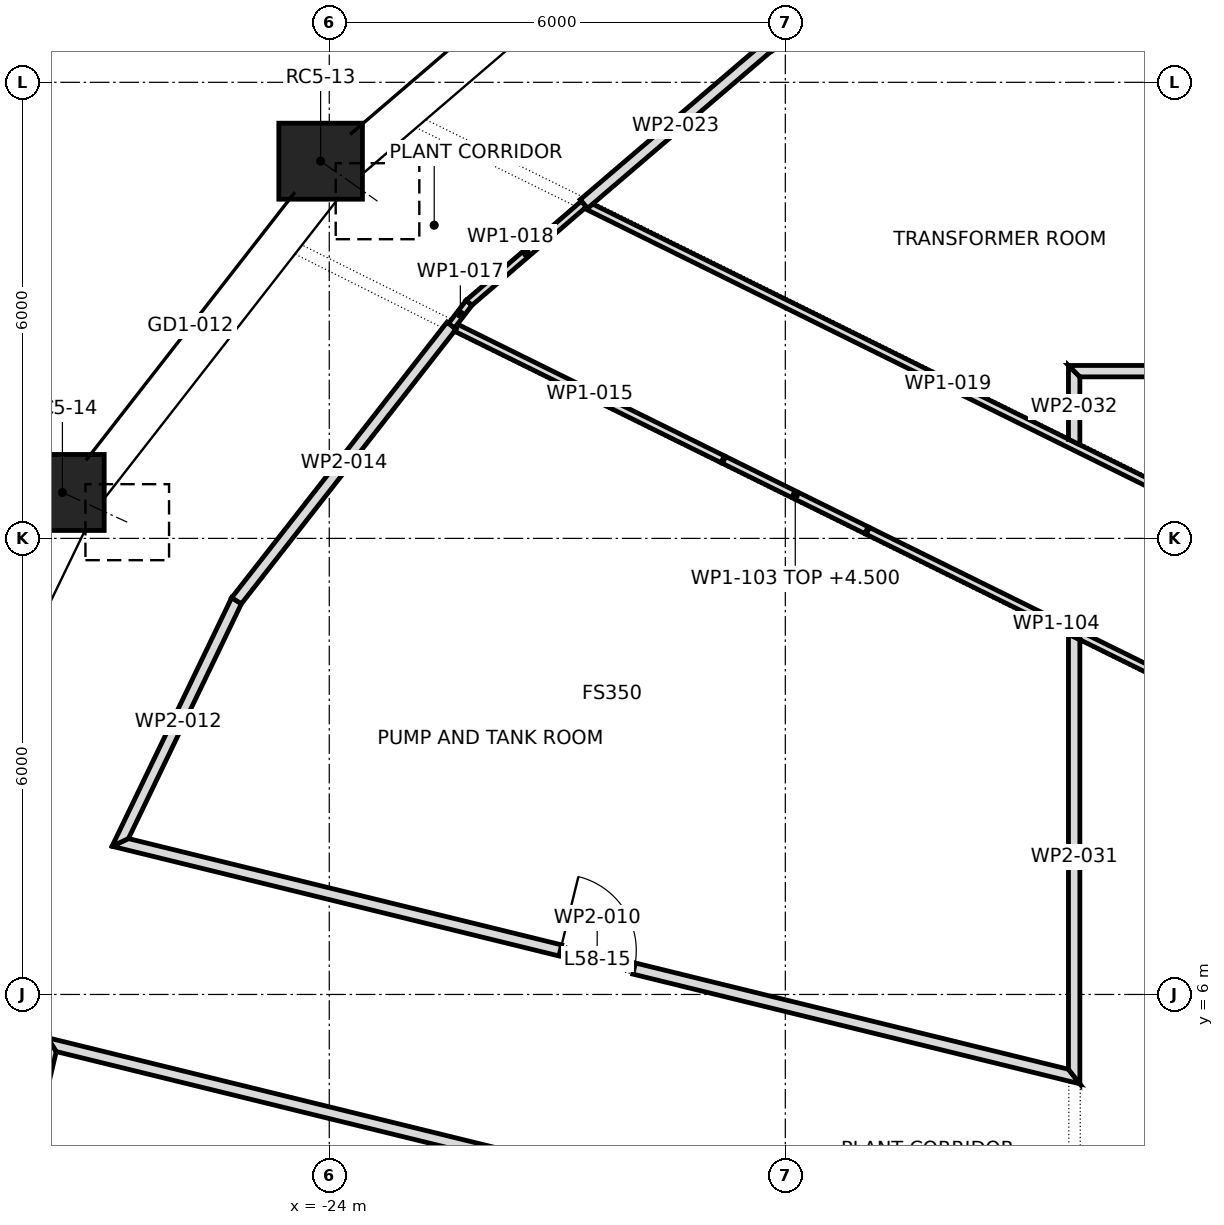
"""IFC4 building model, lengths in metres.
Left out: names, types, materials, properties, quantities, classifications, styles, units other than length and angle.
Written with IfcOpenShell. Run it as: python <this file> out.ifc"""

import sys

from ifc_helpers import new_model, si_unit, direction, frame, frame_2d, origin, origin_2d, place, context, subcontext, project, spatial, polyline, rectangle, outline, extrude, element, fill, save


model = new_model("IFC4")
c1 = context("Model", 3, precision=1e-05, world=origin(), true_north=direction((0.0, 1.0)))
c2 = subcontext(c1, "Body", "Model", "MODEL_VIEW")
j1 = project(units=[si_unit("LENGTHUNIT", "METRE"), si_unit("PLANEANGLEUNIT", "RADIAN")], contexts=[c1])
p1 = place(None, origin())
s1 = spatial("IfcSite", under=j1, at=p1, CompositionType="ELEMENT")
p2 = place(p1, origin())
s2 = spatial("IfcBuilding", under=s1, at=p2, CompositionType="ELEMENT")
p3 = place(p2, frame((0.0, 0.0, 250.9)))
s3 = spatial("IfcBuildingStorey", under=s2, at=p3, CompositionType="ELEMENT", Elevation=250.9)
p4 = place(p3, frame((-24.114, 16.962, 0.086), z_axis=(0.14102688006, -0.099169586892, 0.985026300226), x_axis=(0.575215805529, 0.818001697473, 0.0)))
e1 = element("IfcColumn", 1, at=p4, inside=s3, PredefinedType="COLUMN", context=c2, shape_type="SweptSolid", body=[
    extrude(rectangle(XDim=1.1, YDim=1.0, at=origin_2d()), origin(), (0.0, 0.0, 1.0), 5.308),
])
p5 = place(p3, frame((-27.511, 12.604, 0.088), z_axis=(0.160721780276, -0.073644982891, 0.984248406572), x_axis=(0.416565116305, 0.909105881555, 0.0)))
e2 = element("IfcColumn", 2, at=p5, inside=s3, PredefinedType="COLUMN", context=c2, shape_type="SweptSolid", body=[
    extrude(rectangle(XDim=1.1, YDim=1.0, at=origin_2d()), origin(), (0.0, 0.0, 1.0), 5.307),
])
p6 = place(p3, frame((-28.362, 2.302, 0.0), z_axis=(0.0, 0.0, 1.0), x_axis=(0.228907359016, 0.973448211765, 0.0)))
e3 = element("IfcWall", 3, at=p6, inside=s3, PredefinedType="PARTITIONING", context=c2, shape_type="SweptSolid", body=[
    extrude(outline(polyline([(0.017, -0.075), (1.531, -0.075), (3.045, -0.075), (3.196, 0.075), (1.598, 0.075), (0.0, 0.075), (0.017, -0.075)])), origin(), (0.0, 0.0, 1.0), 5.1),
])
p7 = place(p3, frame((-27.721, 5.357, 0.0), z_axis=(0.0, 0.0, 1.0), x_axis=(0.971194300178, -0.238288965968, 0.0)))
e4 = element("IfcWall", 4, at=p7, inside=s3, PredefinedType="PARTITIONING", context=c2, shape_type="SweptSolid", body=[
    extrude(outline(polyline([(0.151, -0.075), (2.11, -0.075), (4.069, -0.075), (6.028, -0.075), (7.987, -0.075), (9.946, -0.075), (11.905, -0.075), (13.863, -0.075), (13.981, 0.075), (11.984, 0.075), (9.986, 0.075), (7.989, 0.075), (5.992, 0.075), (3.995, 0.075), (1.997, 0.075), (0.0, 0.075), (0.0, 0.075), (0.151, -0.075)])), origin(), (0.0, 0.0, 1.0), 5.1),
])
p8 = place(p3, frame((-26.84, 8.022, 0.0), z_axis=(0.0, 0.0, 1.0), x_axis=(0.971181734847, -0.238340172652, 0.0)))
e5 = element("IfcWall", 5, at=p8, inside=s3, PredefinedType="PARTITIONING", context=c2, shape_type="SweptSolid", body=[
    extrude(outline(polyline([(0.0, -0.075), (1.873, -0.075), (3.746, -0.075), (5.619, -0.075), (7.492, -0.075), (9.365, -0.075), (11.238, -0.075), (13.111, -0.075), (12.919, 0.075), (11.1, 0.075), (9.281, 0.075), (7.462, 0.075), (5.643, 0.075), (3.823, 0.075), (2.004, 0.075), (0.185, 0.075), (0.0, -0.075), (0.0, -0.075)])), origin(), (0.0, 0.0, 1.0), 5.1),
])
p9 = place(p8, frame((6.054, 0.0, 0.0)))
e6 = element("IfcOpeningElement", 6, at=p9, cuts=e5, PredefinedType="OPENING", context=c2, shape_type="SweptSolid", body=[
    extrude(rectangle(XDim=1.0, YDim=2.1, at=frame_2d((0.5, 1.05))), frame((0.0, 0.087, 0.0), z_axis=(0.0, -1.0, 0.0), x_axis=(1.0, 0.0, 0.0)), (0.0, 0.0, 1.0), 0.174),
])
p10 = place(p3, frame((-25.217, 11.187, 0.0), z_axis=(0.0, 0.0, 1.0), x_axis=(-0.433546599655, -0.901131148018, 0.0)))
e7 = element("IfcWall", 7, at=p10, inside=s3, PredefinedType="PARTITIONING", context=c2, shape_type="SweptSolid", body=[
    extrude(outline(polyline([(0.0, -0.075), (1.815, -0.075), (3.629, -0.075), (3.445, 0.075), (1.73, 0.075), (0.016, 0.075), (0.0, -0.074), (0.0, -0.075)])), origin(), (0.0, 0.0, 1.0), 5.1),
])
p11 = place(p3, frame((-22.391, 14.798, 0.0), z_axis=(0.0, 0.0, 1.0), x_axis=(-0.615933342792, -0.787798271918, 0.0)))
e8 = element("IfcWall", 8, at=p11, inside=s3, PredefinedType="PARTITIONING", context=c2, shape_type="SweptSolid", body=[
    extrude(outline(polyline([(0.0, -0.075), (1.534, -0.075), (3.067, -0.075), (4.601, -0.075), (4.585, 0.075), (3.057, 0.075), (1.528, 0.075), (0.0, 0.075), (0.0, -0.075)])), origin(), (0.0, 0.0, 1.0), 5.1),
])
p12 = place(p3, frame((-22.335, 14.773, 0.0), z_axis=(0.0, 0.0, 1.0), x_axis=(0.896802594661, -0.442430905577, 0.0)))
e9 = element("IfcWall", 9, at=p12, inside=s3, PredefinedType="PARTITIONING", context=c2, shape_type="SweptSolid", body=[
    extrude(outline(polyline([(0.0, 0.05), (0.0, -0.015), (0.012, -0.017), (0.005, -0.05), (1.965, -0.05), (3.926, -0.05), (3.926, 0.05), (1.963, 0.05), (0.0, 0.05)])), origin(), (0.0, 0.0, 1.0), 5.1),
])
p13 = place(p3, frame((-22.157, 15.104, 0.0), z_axis=(0.0, 0.0, 1.0), x_axis=(-0.608085380433, -0.793871633266, 0.0)))
e10 = element("IfcWall", 10, at=p13, inside=s3, PredefinedType="PARTITIONING", context=c2, shape_type="SweptSolid", body=[
    extrude(outline(polyline([(0.0, -0.05), (0.385, -0.05), (0.385, -0.002), (0.385, 0.05), (0.323, 0.05), (0.322, 0.05), (0.322, 0.05), (0.01, 0.05), (0.01, 0.05), (0.01, 0.05), (0.005, 0.0), (0.0, -0.048), (0.0, -0.05)])), origin(), (0.0, 0.0, 1.0), 5.1),
])
p14 = place(p3, frame((-20.65, 16.4, 0.0), z_axis=(0.0, 0.0, 1.0), x_axis=(-0.757874548708, -0.652400313014, 0.0)))
e11 = element("IfcWall", 11, at=p14, inside=s3, PredefinedType="PARTITIONING", context=c2, shape_type="SweptSolid", body=[
    extrude(outline(polyline([(1.998, -0.05), (1.998, -0.049), (1.987, 0.05), (0.0, 0.05), (0.0, -0.05), (1.998, -0.05)])), origin(), (0.0, 0.0, 1.0), 5.1),
])
p15 = place(p3, frame((-20.62, 16.385, 0.0), z_axis=(0.0, 0.0, 1.0), x_axis=(0.896490791299, -0.443062367073, 0.0)))
e12 = element("IfcWall", 12, at=p15, inside=s3, PredefinedType="PARTITIONING", context=c2, shape_type="SweptSolid", body=[
    extrude(outline(polyline([(10.575, 0.05), (8.817, 0.05), (7.059, 0.05), (7.054, 0.048), (7.053, 0.05), (5.307, 0.05), (3.561, 0.05), (1.815, 0.05), (0.07, 0.05), (0.036, -0.03), (0.013, -0.02), (0.0, -0.05), (0.0, -0.05), (1.762, -0.05), (3.525, -0.05), (5.287, -0.05), (7.05, -0.05), (8.812, -0.05), (10.575, -0.05), (10.575, 0.05)])), origin(), (0.0, 0.0, 1.0), 5.1),
])
p16 = place(p3, frame((-18.235, 18.465, 0.0), z_axis=(0.0, 0.0, 1.0), x_axis=(-0.76011828392, -0.649784729315, 0.0)))
e13 = element("IfcWall", 13, at=p16, inside=s3, PredefinedType="PARTITIONING", context=c2, shape_type="SweptSolid", body=[
    extrude(outline(polyline([(3.177, 0.075), (1.596, 0.075), (0.014, 0.075), (0.0, -0.075), (1.589, -0.075), (3.177, -0.075), (3.177, 0.075)])), origin(), (0.0, 0.0, 1.0), 5.1),
])
p17 = place(p3, frame((-14.397, 20.666, 0.0), z_axis=(0.0, 0.0, 1.0), x_axis=(-0.867259694759, -0.497856025219, 0.0)))
e14 = element("IfcWall", 14, at=p17, inside=s3, PredefinedType="PARTITIONING", context=c2, shape_type="SweptSolid", body=[
    extrude(outline(polyline([(0.0, -0.075), (1.479, -0.075), (2.959, -0.075), (4.438, -0.075), (4.424, 0.075), (2.998, 0.075), (1.571, 0.075), (0.145, 0.075), (0.0, -0.075), (0.0, -0.075)])), origin(), (0.0, 0.0, 1.0), 5.1),
])
p18 = place(p17, frame((1.752, 0.0, 0.0)))
e15 = element("IfcOpeningElement", 15, at=p18, cuts=e14, PredefinedType="OPENING", context=c2, shape_type="SweptSolid", body=[
    extrude(rectangle(XDim=1.0, YDim=2.1, at=frame_2d((0.5, 1.05))), frame((0.0, 0.087, 0.0), z_axis=(0.0, -1.0, 0.0), x_axis=(1.0, 0.0, 0.0)), (0.0, 0.0, 1.0), 0.174),
])
p19 = place(p3, frame((-14.498, 20.692, 0.0), z_axis=(0.0, 0.0, 1.0), x_axis=(0.527266712456, -0.849699837552, 0.0)))
e16 = element("IfcWall", 16, at=p19, inside=s3, PredefinedType="PARTITIONING", context=c2, shape_type="SweptSolid", body=[
    extrude(outline(polyline([(0.145, -0.075), (1.985, -0.075), (3.825, -0.075), (5.665, -0.075), (7.505, -0.075), (7.775, 0.075), (5.831, 0.075), (3.887, 0.075), (1.944, 0.075), (0.0, 0.075), (0.145, -0.075)])), origin(), (0.0, 0.0, 1.0), 5.1),
])
p20 = place(p3, frame((-14.2, 4.824, 0.0), z_axis=(0.0, 0.0, 1.0), x_axis=(0.0, 1.0, 0.0)))
e17 = element("IfcWall", 17, at=p20, inside=s3, PredefinedType="PARTITIONING", context=c2, shape_type="SweptSolid", body=[
    extrude(outline(polyline([(0.0, -0.075), (1.948, -0.075), (3.895, -0.075), (5.843, -0.075), (5.917, 0.075), (5.917, 0.075), (4.008, 0.075), (2.1, 0.075), (0.191, 0.075), (0.095, 0.0), (0.0, -0.075), (0.0, -0.075)])), origin(), (0.0, 0.0, 1.0), 5.1),
])
p21 = place(p3, frame((-14.2, 13.231, 0.0), z_axis=(0.0, 0.0, 1.0), x_axis=(0.0, 1.0, 0.0)))
e18 = element("IfcWall", 18, at=p21, inside=s3, PredefinedType="PARTITIONING", context=c2, shape_type="SweptSolid", body=[
    extrude(outline(polyline([(0.0, -0.075), (0.894, -0.075), (1.043, 0.075), (0.074, 0.075), (0.0, -0.074), (0.0, -0.075)])), origin(), (0.0, 0.0, 1.0), 5.1),
])
p22 = place(p3, frame((-14.275, 14.2, 0.0), z_axis=(0.0, 0.0, 1.0), x_axis=(1.0, 0.0, 0.0)))
e19 = element("IfcWall", 19, at=p22, inside=s3, PredefinedType="PARTITIONING", context=c2, shape_type="SweptSolid", body=[
    extrude(outline(polyline([(3.94, -0.075), (3.94, -0.075), (3.67, 0.075), (1.835, 0.075), (0.0, 0.075), (0.15, -0.075), (2.045, -0.075), (3.94, -0.075)])), origin(), (0.0, 0.0, 1.0), 5.1),
])
p23 = place(p3, frame((-18.815, 13.036, 0.0), z_axis=(0.0, 0.0, 1.0), x_axis=(0.896845699722, -0.442343521361, 0.0)))
e20 = element("IfcWall", 20, at=p23, inside=s3, PredefinedType="PARTITIONING", context=c2, shape_type="SweptSolid", body=[
    extrude(outline(polyline([(0.0, 0.05), (0.0, -0.05), (2.108, -0.05), (2.108, 0.05), (0.0, 0.05)])), origin(), (0.0, 0.0, 1.0), 4.5),
])
p24 = place(p3, frame((-16.924, 12.104, 0.0), z_axis=(0.0, 0.0, 1.0), x_axis=(0.896817761144, -0.442400161954, 0.0)))
e21 = element("IfcWall", 21, at=p24, inside=s3, PredefinedType="PARTITIONING", context=c2, shape_type="SweptSolid", body=[
    extrude(outline(polyline([(0.0, -0.05), (1.569, -0.05), (3.139, -0.05), (3.144, -0.047), (3.146, -0.05), (5.546, -0.05), (5.546, 0.05), (3.698, 0.05), (1.849, 0.05), (0.0, 0.05), (0.0, -0.05)])), origin(), (0.0, 0.0, 1.0), 5.1),
])
p25 = place(p9, origin())
e22 = element("IfcDoor", 22, at=p25, inside=s3, OperationType="SINGLE_SWING_RIGHT", PredefinedType="DOOR", context=c2, shape_type="SweptSolid", body=[
    extrude(rectangle(XDim=1.0, YDim=2.1, at=frame_2d((0.5, 1.05))), frame((0.0, 0.025, 0.0), z_axis=(0.0, -1.0, 0.0), x_axis=(1.0, 0.0, 0.0)), (0.0, 0.0, 1.0), 0.05),
])
fill(e6, e22)
save(model, sys.argv[1])
